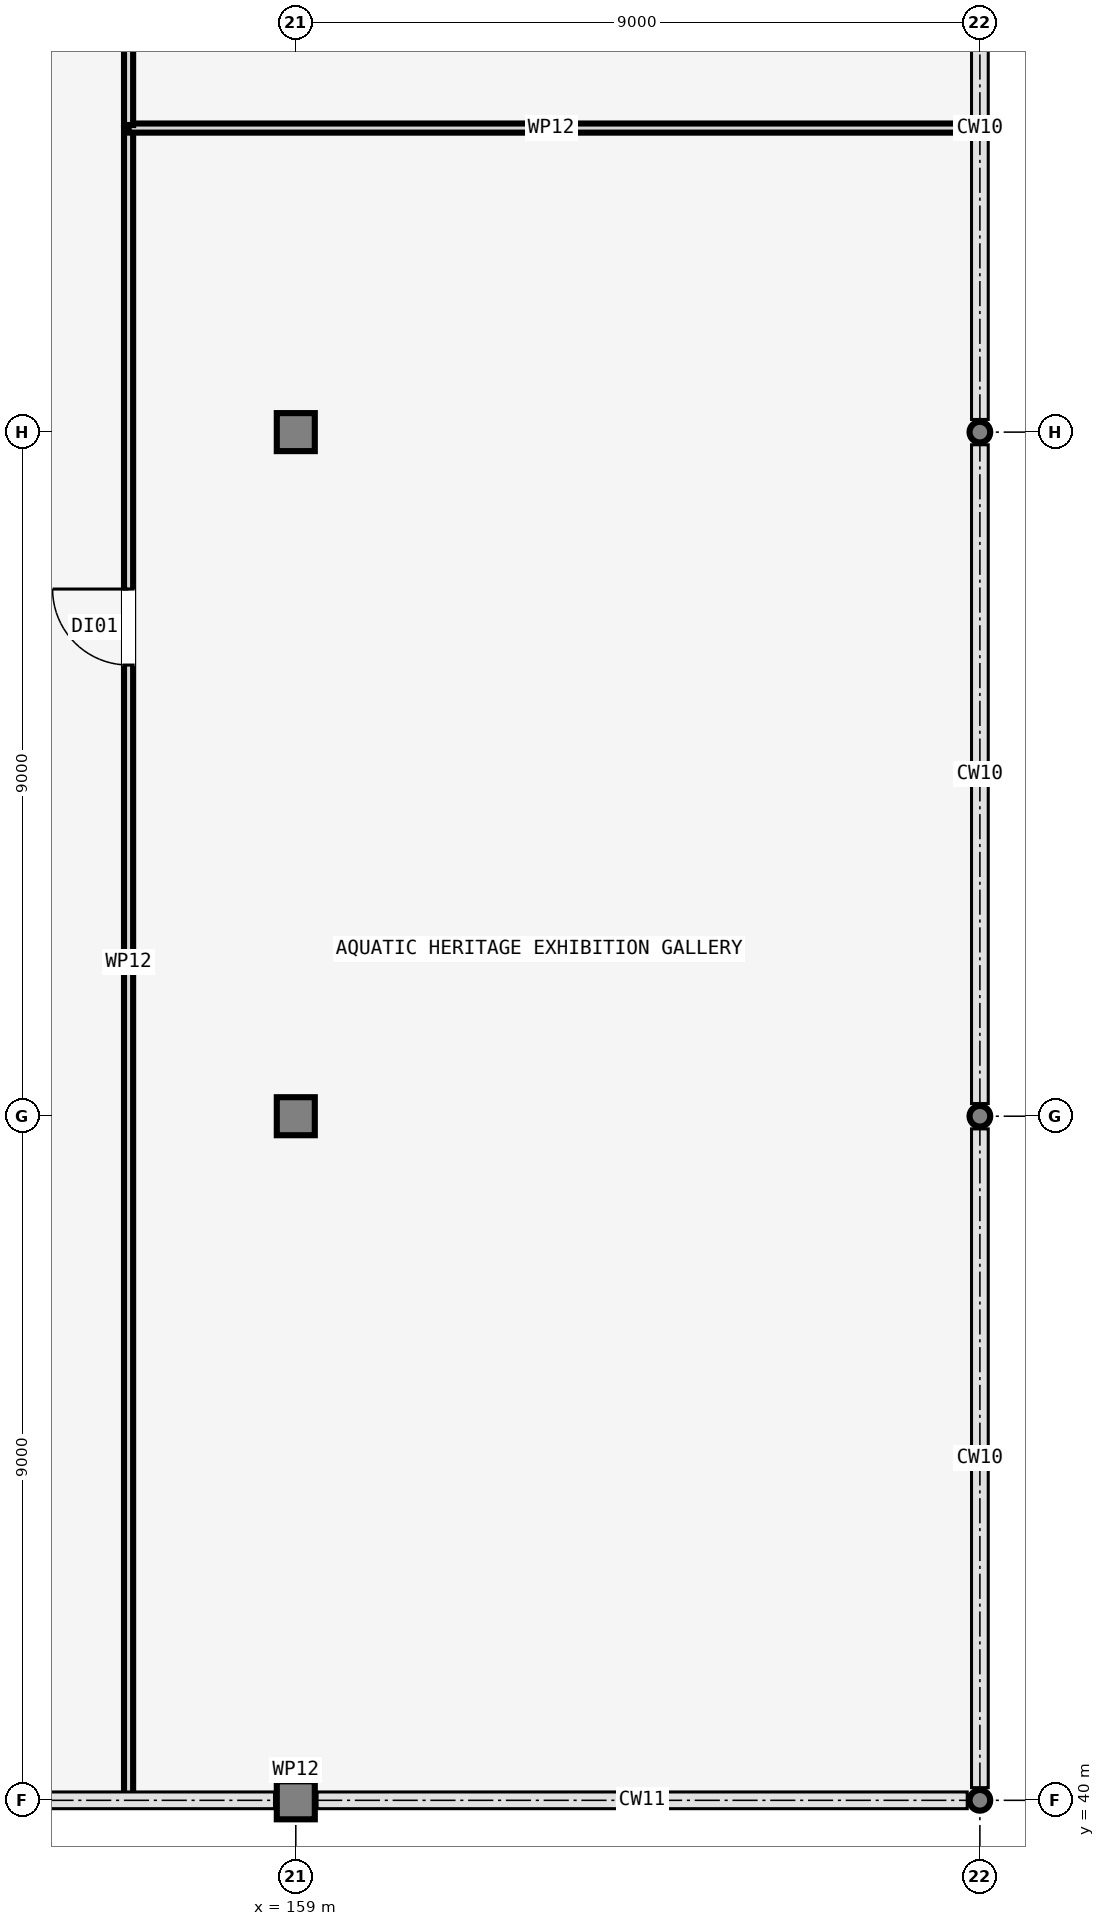
"""IFC4 building model, lengths in metres.
Left out: names, types, materials, properties, quantities, classifications, styles, units other than length and angle.
Written with IfcOpenShell. Run it as: python <this file> out.ifc"""

import sys

from ifc_helpers import new_model, si_unit, direction, frame, frame_2d, origin, origin_2d, place, context, subcontext, project, spatial, rectangle, hollow_circle, extrude, element, fill, save


model = new_model("IFC4")
c1 = context("Model", 3, precision=1e-05, world=origin(), true_north=direction((0.0, 1.0)))
c2 = subcontext(c1, "Body", "Model", "MODEL_VIEW")
j1 = project(units=[si_unit("LENGTHUNIT", "METRE"), si_unit("PLANEANGLEUNIT", "RADIAN")], contexts=[c1])
p1 = place(None, origin())
s1 = spatial("IfcSite", under=j1, at=p1, CompositionType="ELEMENT")
p2 = place(p1, origin())
s2 = spatial("IfcBuilding", under=s1, at=p2, CompositionType="ELEMENT")
p3 = place(p2, frame((0.0, 0.0, 4.8)))
s3 = spatial("IfcBuildingStorey", under=s2, at=p3, CompositionType="ELEMENT", Elevation=4.8)
for number, where, z_axis, x_axis in (
    (1, (159.0, 40.0, 0.0), (0.0, 0.0, 1.0), (1.0, 0.0, 0.0)),
    (2, (159.0, 49.0, 0.0), (0.0, 0.0, 1.0), (1.0, 0.0, 0.0)),
    (3, (159.0, 58.0, 0.0), (0.0, 0.0, 1.0), (1.0, 0.0, 0.0)),
):
    element("IfcColumn", number, at=place(p3, frame(where, z_axis=z_axis, x_axis=x_axis)), inside=s3, PredefinedType="COLUMN", context=c2, shape_type="SweptSolid", body=[
        extrude(rectangle(XDim=0.5, YDim=0.5, at=origin_2d()), origin(), (0.0, 0.0, 1.0), 4.5),
    ])
for number, where, z_axis, x_axis in (
    (4, (168.0, 40.0, 0.0), (0.0, 0.0, 1.0), (1.0, 0.0, 0.0)),
    (5, (168.0, 49.0, 0.0), (0.0, 0.0, 1.0), (1.0, 0.0, 0.0)),
    (6, (168.0, 58.0, 0.0), (0.0, 0.0, 1.0), (1.0, 0.0, 0.0)),
):
    element("IfcColumn", number, at=place(p3, frame(where, z_axis=z_axis, x_axis=x_axis)), inside=s3, PredefinedType="COLUMN", context=c2, shape_type="SweptSolid", body=[
        extrude(hollow_circle(Radius=0.136, WallThickness=0.012, at=origin_2d()), origin(), (0.0, 0.0, 1.0), 4.5),
    ])
p4 = place(p3, frame((156.8, 40.071, 0.0), z_axis=(0.0, 0.0, 1.0), x_axis=(0.0, 1.0, 0.0)))
e7 = element("IfcWall", 7, at=p4, inside=s3, PredefinedType="PARTITIONING", context=c2, shape_type="SweptSolid", body=[
    extrude(rectangle(XDim=21.929, YDim=0.12, at=frame_2d((10.964, 0.0))), origin(), (0.0, 0.0, 1.0), 3.4),
])
p5 = place(p4, frame((14.865, 0.0, 0.0)))
e8 = element("IfcOpeningElement", 8, at=p5, cuts=e7, PredefinedType="OPENING", context=c2, shape_type="SweptSolid", body=[
    extrude(rectangle(XDim=1.0, YDim=2.1, at=frame_2d((0.5, 1.05))), frame((0.0, 0.07, 0.0), z_axis=(0.0, -1.0, 0.0), x_axis=(1.0, 0.0, 0.0)), (0.0, 0.0, 1.0), 0.14),
])
p6 = place(p3, frame((159.28, 40.4, 0.0), z_axis=(0.0, 0.0, 1.0), x_axis=(-1.0, 0.0, 0.0)))
e9 = element("IfcWall", 9, at=p6, inside=s3, PredefinedType="PARTITIONING", context=c2, shape_type="SweptSolid", body=[
    extrude(rectangle(XDim=0.56, YDim=0.12, at=frame_2d((0.28, 0.0))), origin(), (0.0, 0.0, 1.0), 3.4),
])
p7 = place(p3, frame((156.8, 62.0, 0.0), z_axis=(0.0, 0.0, 1.0), x_axis=(1.0, 0.0, 0.0)))
e10 = element("IfcWall", 10, at=p7, inside=s3, PredefinedType="PARTITIONING", context=c2, shape_type="SweptSolid", body=[
    extrude(rectangle(XDim=11.12, YDim=0.12, at=frame_2d((5.56, 0.0))), origin(), (0.0, 0.0, 1.0), 3.4),
])
p8 = place(p3, frame((156.8, 62.04, 0.0), z_axis=(0.0, 0.0, 1.0), x_axis=(0.0, 1.0, 0.0)))
e11 = element("IfcWall", 11, at=p8, inside=s3, PredefinedType="PARTITIONING", context=c2, shape_type="SweptSolid", body=[
    extrude(rectangle(XDim=21.189, YDim=0.12, at=frame_2d((10.594, 0.0))), origin(), (0.0, 0.0, 1.0), 3.4),
])
p9 = place(p8, frame((10.094, 0.0, 0.0)))
e12 = element("IfcOpeningElement", 12, at=p9, cuts=e11, PredefinedType="OPENING", context=c2, shape_type="SweptSolid", body=[
    extrude(rectangle(XDim=1.0, YDim=2.1, at=frame_2d((0.5, 1.05))), frame((0.0, 0.07, 0.0), z_axis=(0.0, -1.0, 0.0), x_axis=(1.0, 0.0, 0.0)), (0.0, 0.0, 1.0), 0.14),
])
p10 = place(p5, origin())
e13 = element("IfcDoor", 13, at=p10, inside=s3, OperationType="SINGLE_SWING_RIGHT", PredefinedType="DOOR", context=c2, shape_type="SweptSolid", body=[
    extrude(rectangle(XDim=1.0, YDim=2.1, at=frame_2d((0.5, 1.05))), frame((0.0, 0.025, 0.0), z_axis=(0.0, -1.0, 0.0), x_axis=(1.0, 0.0, 0.0)), (0.0, 0.0, 1.0), 0.05),
])
fill(e8, e13)
save(model, sys.argv[1])
